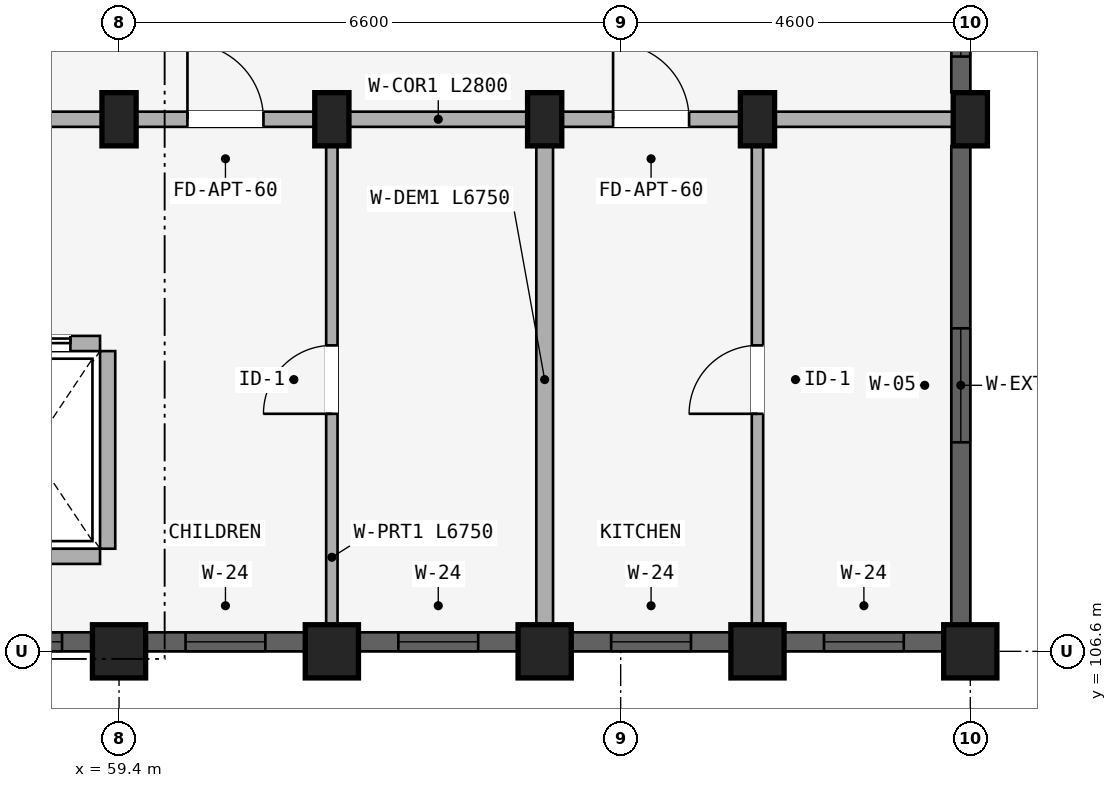
"""IFC4 building model, lengths in metres.
Left out: names, types, materials, properties, quantities, classifications, styles, units other than length and angle.
Written with IfcOpenShell. Run it as: python <this file> out.ifc"""

import sys

from ifc_helpers import new_model, si_unit, direction, frame, frame_2d, origin, origin_2d, place, context, subcontext, project, spatial, rectangle, extrude, element, fill, save


model = new_model("IFC4")
c1 = context("Model", 3, precision=1e-05, world=origin(), true_north=direction((0.0, 1.0)))
c2 = subcontext(c1, "Body", "Model", "MODEL_VIEW")
j1 = project(units=[si_unit("LENGTHUNIT", "METRE"), si_unit("PLANEANGLEUNIT", "RADIAN")], contexts=[c1])
p1 = place(None, origin())
s1 = spatial("IfcSite", under=j1, at=p1, CompositionType="ELEMENT")
p2 = place(p1, origin())
s2 = spatial("IfcBuilding", under=s1, at=p2, CompositionType="ELEMENT")
p3 = place(p2, frame((0.0, 0.0, 21.3)))
s3 = spatial("IfcBuildingStorey", under=s2, at=p3, CompositionType="ELEMENT", Elevation=21.3)
p4 = place(p3, frame((59.4, 106.6, 0.0), z_axis=(0.0, 0.0, 1.0), x_axis=(1.0, 0.0, 0.0)))
e1 = element("IfcColumn", 1, at=p4, inside=s3, PredefinedType="COLUMN", context=c2, shape_type="SweptSolid", body=[
    extrude(rectangle(XDim=0.7, YDim=0.7, at=origin_2d()), origin(), (0.0, 0.0, 1.0), 2.93),
])
p5 = place(p3, frame((59.4, 113.6, 0.0), z_axis=(0.0, 0.0, 1.0), x_axis=(1.0, 0.0, 0.0)))
e2 = element("IfcColumn", 2, at=p5, inside=s3, PredefinedType="COLUMN", context=c2, shape_type="SweptSolid", body=[
    extrude(rectangle(XDim=0.45, YDim=0.7, at=origin_2d()), origin(), (0.0, 0.0, 1.0), 2.93),
])
p6 = place(p3, frame((62.2, 106.6, 0.0), z_axis=(0.0, 0.0, 1.0), x_axis=(1.0, 0.0, 0.0)))
e3 = element("IfcColumn", 3, at=p6, inside=s3, PredefinedType="COLUMN", context=c2, shape_type="SweptSolid", body=[
    extrude(rectangle(XDim=0.7, YDim=0.7, at=origin_2d()), origin(), (0.0, 0.0, 1.0), 2.93),
])
p7 = place(p3, frame((62.2, 113.6, 0.0), z_axis=(0.0, 0.0, 1.0), x_axis=(1.0, 0.0, 0.0)))
e4 = element("IfcColumn", 4, at=p7, inside=s3, PredefinedType="COLUMN", context=c2, shape_type="SweptSolid", body=[
    extrude(rectangle(XDim=0.45, YDim=0.7, at=origin_2d()), origin(), (0.0, 0.0, 1.0), 2.93),
])
p8 = place(p3, frame((65.0, 106.6, 0.0), z_axis=(0.0, 0.0, 1.0), x_axis=(1.0, 0.0, 0.0)))
e5 = element("IfcColumn", 5, at=p8, inside=s3, PredefinedType="COLUMN", context=c2, shape_type="SweptSolid", body=[
    extrude(rectangle(XDim=0.7, YDim=0.7, at=origin_2d()), origin(), (0.0, 0.0, 1.0), 2.93),
])
p9 = place(p3, frame((65.0, 113.6, 0.0), z_axis=(0.0, 0.0, 1.0), x_axis=(1.0, 0.0, 0.0)))
e6 = element("IfcColumn", 6, at=p9, inside=s3, PredefinedType="COLUMN", context=c2, shape_type="SweptSolid", body=[
    extrude(rectangle(XDim=0.45, YDim=0.7, at=origin_2d()), origin(), (0.0, 0.0, 1.0), 2.93),
])
p10 = place(p3, frame((67.8, 106.6, 0.0), z_axis=(0.0, 0.0, 1.0), x_axis=(1.0, 0.0, 0.0)))
e7 = element("IfcColumn", 7, at=p10, inside=s3, PredefinedType="COLUMN", context=c2, shape_type="SweptSolid", body=[
    extrude(rectangle(XDim=0.7, YDim=0.7, at=origin_2d()), origin(), (0.0, 0.0, 1.0), 2.93),
])
p11 = place(p3, frame((67.8, 113.6, 0.0), z_axis=(0.0, 0.0, 1.0), x_axis=(1.0, 0.0, 0.0)))
e8 = element("IfcColumn", 8, at=p11, inside=s3, PredefinedType="COLUMN", context=c2, shape_type="SweptSolid", body=[
    extrude(rectangle(XDim=0.45, YDim=0.7, at=origin_2d()), origin(), (0.0, 0.0, 1.0), 2.93),
])
p12 = place(p3, frame((70.6, 106.6, 0.0), z_axis=(0.0, 0.0, 1.0), x_axis=(1.0, 0.0, 0.0)))
e9 = element("IfcColumn", 9, at=p12, inside=s3, PredefinedType="COLUMN", context=c2, shape_type="SweptSolid", body=[
    extrude(rectangle(XDim=0.7, YDim=0.7, at=origin_2d()), origin(), (0.0, 0.0, 1.0), 2.93),
])
p13 = place(p3, frame((70.6, 113.6, 0.0), z_axis=(0.0, 0.0, 1.0), x_axis=(1.0, 0.0, 0.0)))
e10 = element("IfcColumn", 10, at=p13, inside=s3, PredefinedType="COLUMN", context=c2, shape_type="SweptSolid", body=[
    extrude(rectangle(XDim=0.45, YDim=0.7, at=origin_2d()), origin(), (0.0, 0.0, 1.0), 2.93),
])
p14 = place(p3, frame((59.25, 107.95, 0.0), z_axis=(0.0, 0.0, 1.0), x_axis=(0.0, 1.0, 0.0)))
e11 = element("IfcWall", 11, at=p14, inside=s3, PredefinedType="STANDARD", context=c2, shape_type="SweptSolid", body=[
    extrude(rectangle(XDim=2.6, YDim=0.2, at=frame_2d((1.3, 0.0))), origin(), (0.0, 0.0, 1.0), 2.372),
])
p15 = place(p3, frame((57.35, 107.85, 0.0), z_axis=(0.0, 0.0, 1.0), x_axis=(1.0, 0.0, 0.0)))
e12 = element("IfcWall", 12, at=p15, inside=s3, PredefinedType="STANDARD", context=c2, shape_type="SweptSolid", body=[
    extrude(rectangle(XDim=1.8, YDim=0.2, at=frame_2d((0.9, 0.0))), origin(), (0.0, 0.0, 1.0), 2.93),
])
p16 = place(p3, frame((57.35, 110.65, 0.0), z_axis=(0.0, 0.0, 1.0), x_axis=(1.0, 0.0, 0.0)))
e13 = element("IfcWall", 13, at=p16, inside=s3, PredefinedType="STANDARD", context=c2, shape_type="SweptSolid", body=[
    extrude(rectangle(XDim=1.8, YDim=0.2, at=frame_2d((0.9, 0.0))), origin(), (0.0, 0.0, 1.0), 2.93),
])
p17 = place(p16, frame((0.39, 0.0, 0.0)))
e14 = element("IfcOpeningElement", 14, at=p17, cuts=e13, PredefinedType="OPENING", context=c2, shape_type="SweptSolid", body=[
    extrude(rectangle(XDim=1.02, YDim=2.15, at=frame_2d((0.51, 1.075))), frame((0.0, 0.11, 0.0), z_axis=(0.0, -1.0, 0.0), x_axis=(1.0, 0.0, 0.0)), (0.0, 0.0, 1.0), 0.22),
])
p18 = place(p3, frame((53.75, 113.6, 0.0), z_axis=(0.0, 0.0, 1.0), x_axis=(1.0, 0.0, 0.0)))
e15 = element("IfcWall", 15, at=p18, inside=s3, PredefinedType="STANDARD", context=c2, shape_type="SweptSolid", body=[
    extrude(rectangle(XDim=5.6, YDim=0.2, at=frame_2d((2.8, 0.0))), origin(), (0.0, 0.0, 1.0), 2.372),
])
p19 = place(p18, frame((1.91, 0.0, 0.0)))
e16 = element("IfcOpeningElement", 16, at=p19, cuts=e15, PredefinedType="OPENING", context=c2, shape_type="SweptSolid", body=[
    extrude(rectangle(XDim=1.22, YDim=2.15, at=frame_2d((0.61, 1.075))), frame((0.0, 0.11, 0.0), z_axis=(0.0, -1.0, 0.0), x_axis=(1.0, 0.0, 0.0)), (0.0, 0.0, 1.0), 0.22),
])
p20 = place(p3, frame((59.4, 113.6, 0.0), z_axis=(0.0, 0.0, 1.0), x_axis=(1.0, 0.0, 0.0)))
e17 = element("IfcWall", 17, at=p20, inside=s3, PredefinedType="STANDARD", context=c2, shape_type="SweptSolid", body=[
    extrude(rectangle(XDim=2.8, YDim=0.2, at=frame_2d((1.4, 0.0))), origin(), (0.0, 0.0, 1.0), 2.372),
])
p21 = place(p20, frame((0.9, 0.0, 0.0)))
e18 = element("IfcOpeningElement", 18, at=p21, cuts=e17, PredefinedType="OPENING", context=c2, shape_type="SweptSolid", body=[
    extrude(rectangle(XDim=1.0, YDim=2.15, at=frame_2d((0.5, 1.075))), frame((0.0, 0.11, 0.0), z_axis=(0.0, -1.0, 0.0), x_axis=(1.0, 0.0, 0.0)), (0.0, 0.0, 1.0), 0.22),
])
p22 = place(p3, frame((62.2, 113.6, 0.0), z_axis=(0.0, 0.0, 1.0), x_axis=(1.0, 0.0, 0.0)))
e19 = element("IfcWall", 19, at=p22, inside=s3, PredefinedType="STANDARD", context=c2, shape_type="SweptSolid", body=[
    extrude(rectangle(XDim=2.8, YDim=0.2, at=frame_2d((1.4, 0.0))), origin(), (0.0, 0.0, 1.0), 2.372),
])
p23 = place(p3, frame((65.0, 113.6, 0.0), z_axis=(0.0, 0.0, 1.0), x_axis=(1.0, 0.0, 0.0)))
e20 = element("IfcWall", 20, at=p23, inside=s3, PredefinedType="STANDARD", context=c2, shape_type="SweptSolid", body=[
    extrude(rectangle(XDim=2.8, YDim=0.2, at=frame_2d((1.4, 0.0))), origin(), (0.0, 0.0, 1.0), 2.372),
])
p24 = place(p23, frame((0.9, 0.0, 0.0)))
e21 = element("IfcOpeningElement", 21, at=p24, cuts=e20, PredefinedType="OPENING", context=c2, shape_type="SweptSolid", body=[
    extrude(rectangle(XDim=1.0, YDim=2.15, at=frame_2d((0.5, 1.075))), frame((0.0, 0.11, 0.0), z_axis=(0.0, -1.0, 0.0), x_axis=(1.0, 0.0, 0.0)), (0.0, 0.0, 1.0), 0.22),
])
p25 = place(p3, frame((67.8, 113.6, 0.0), z_axis=(0.0, 0.0, 1.0), x_axis=(1.0, 0.0, 0.0)))
e22 = element("IfcWall", 22, at=p25, inside=s3, PredefinedType="STANDARD", context=c2, shape_type="SweptSolid", body=[
    extrude(rectangle(XDim=2.8, YDim=0.2, at=frame_2d((1.4, 0.0))), origin(), (0.0, 0.0, 1.0), 2.372),
])
p26 = place(p3, frame((62.2, 106.8, 0.0), z_axis=(0.0, 0.0, 1.0), x_axis=(0.0, 1.0, 0.0)))
e23 = element("IfcWall", 23, at=p26, inside=s3, PredefinedType="PARTITIONING", context=c2, shape_type="SweptSolid", body=[
    extrude(rectangle(XDim=6.75, YDim=0.15, at=frame_2d((3.375, 0.0))), origin(), (0.0, 0.0, 1.0), 2.372),
])
p27 = place(p26, frame((2.925, 0.0, 0.0)))
e24 = element("IfcOpeningElement", 24, at=p27, cuts=e23, PredefinedType="OPENING", context=c2, shape_type="SweptSolid", body=[
    extrude(rectangle(XDim=0.9, YDim=2.1, at=frame_2d((0.45, 1.05))), frame((0.0, 0.085, 0.0), z_axis=(0.0, -1.0, 0.0), x_axis=(1.0, 0.0, 0.0)), (0.0, 0.0, 1.0), 0.17),
])
p28 = place(p3, frame((65.0, 106.8, 0.0), z_axis=(0.0, 0.0, 1.0), x_axis=(0.0, 1.0, 0.0)))
e25 = element("IfcWall", 25, at=p28, inside=s3, PredefinedType="STANDARD", context=c2, shape_type="SweptSolid", body=[
    extrude(rectangle(XDim=6.75, YDim=0.22, at=frame_2d((3.375, 0.0))), origin(), (0.0, 0.0, 1.0), 2.372),
])
p29 = place(p3, frame((67.8, 106.8, 0.0), z_axis=(0.0, 0.0, 1.0), x_axis=(0.0, 1.0, 0.0)))
e26 = element("IfcWall", 26, at=p29, inside=s3, PredefinedType="PARTITIONING", context=c2, shape_type="SweptSolid", body=[
    extrude(rectangle(XDim=6.75, YDim=0.15, at=frame_2d((3.375, 0.0))), origin(), (0.0, 0.0, 1.0), 2.372),
])
p30 = place(p29, frame((2.925, 0.0, 0.0)))
e27 = element("IfcOpeningElement", 27, at=p30, cuts=e26, PredefinedType="OPENING", context=c2, shape_type="SweptSolid", body=[
    extrude(rectangle(XDim=0.9, YDim=2.1, at=frame_2d((0.45, 1.05))), frame((0.0, 0.085, 0.0), z_axis=(0.0, -1.0, 0.0), x_axis=(1.0, 0.0, 0.0)), (0.0, 0.0, 1.0), 0.17),
])
p31 = place(p3, frame((56.628, 106.725, 0.0), z_axis=(0.0, 0.0, 1.0), x_axis=(1.0, 0.0, 0.0)))
e28 = element("IfcWall", 28, at=p31, inside=s3, PredefinedType="STANDARD", context=c2, shape_type="SweptSolid", body=[
    extrude(rectangle(XDim=2.422, YDim=0.25, at=frame_2d((1.211, 0.0))), origin(), (0.0, 0.0, 1.0), 2.472),
])
p32 = place(p31, frame((0.822, 0.0, 0.772)))
e29 = element("IfcOpeningElement", 29, at=p32, cuts=e28, PredefinedType="OPENING", context=c2, shape_type="SweptSolid", body=[
    extrude(rectangle(XDim=1.2, YDim=1.5, at=frame_2d((0.6, 0.75))), frame((0.0, 0.135, 0.0), z_axis=(0.0, -1.0, 0.0), x_axis=(1.0, 0.0, 0.0)), (0.0, 0.0, 1.0), 0.27),
])
p33 = place(p3, frame((59.753, 106.725, 0.0), z_axis=(0.0, 0.0, 1.0), x_axis=(1.0, 0.0, 0.0)))
e30 = element("IfcWall", 30, at=p33, inside=s3, PredefinedType="STANDARD", context=c2, shape_type="SweptSolid", body=[
    extrude(rectangle(XDim=2.093, YDim=0.25, at=frame_2d((1.046, 0.0))), origin(), (0.0, 0.0, 1.0), 2.472),
])
p34 = place(p33, frame((0.521, 0.0, 0.88)))
e31 = element("IfcOpeningElement", 31, at=p34, cuts=e30, PredefinedType="OPENING", context=c2, shape_type="SweptSolid", body=[
    extrude(rectangle(XDim=1.05, YDim=1.25, at=frame_2d((0.525, 0.625))), frame((0.0, 0.135, 0.0), z_axis=(0.0, -1.0, 0.0), x_axis=(1.0, 0.0, 0.0)), (0.0, 0.0, 1.0), 0.27),
])
p35 = place(p3, frame((62.553, 106.725, 0.0), z_axis=(0.0, 0.0, 1.0), x_axis=(1.0, 0.0, 0.0)))
e32 = element("IfcWall", 32, at=p35, inside=s3, PredefinedType="STANDARD", context=c2, shape_type="SweptSolid", body=[
    extrude(rectangle(XDim=2.093, YDim=0.25, at=frame_2d((1.046, 0.0))), origin(), (0.0, 0.0, 1.0), 2.472),
])
p36 = place(p35, frame((0.521, 0.0, 0.88)))
e33 = element("IfcOpeningElement", 33, at=p36, cuts=e32, PredefinedType="OPENING", context=c2, shape_type="SweptSolid", body=[
    extrude(rectangle(XDim=1.05, YDim=1.25, at=frame_2d((0.525, 0.625))), frame((0.0, 0.135, 0.0), z_axis=(0.0, -1.0, 0.0), x_axis=(1.0, 0.0, 0.0)), (0.0, 0.0, 1.0), 0.27),
])
p37 = place(p3, frame((65.354, 106.725, 0.0), z_axis=(0.0, 0.0, 1.0), x_axis=(1.0, 0.0, 0.0)))
e34 = element("IfcWall", 34, at=p37, inside=s3, PredefinedType="STANDARD", context=c2, shape_type="SweptSolid", body=[
    extrude(rectangle(XDim=2.093, YDim=0.25, at=frame_2d((1.046, 0.0))), origin(), (0.0, 0.0, 1.0), 2.472),
])
p38 = place(p37, frame((0.521, 0.0, 0.88)))
e35 = element("IfcOpeningElement", 35, at=p38, cuts=e34, PredefinedType="OPENING", context=c2, shape_type="SweptSolid", body=[
    extrude(rectangle(XDim=1.05, YDim=1.25, at=frame_2d((0.525, 0.625))), frame((0.0, 0.135, 0.0), z_axis=(0.0, -1.0, 0.0), x_axis=(1.0, 0.0, 0.0)), (0.0, 0.0, 1.0), 0.27),
])
p39 = place(p3, frame((68.154, 106.725, 0.0), z_axis=(0.0, 0.0, 1.0), x_axis=(1.0, 0.0, 0.0)))
e36 = element("IfcWall", 36, at=p39, inside=s3, PredefinedType="STANDARD", context=c2, shape_type="SweptSolid", body=[
    extrude(rectangle(XDim=2.093, YDim=0.25, at=frame_2d((1.046, 0.0))), origin(), (0.0, 0.0, 1.0), 2.472),
])
p40 = place(p39, frame((0.521, 0.0, 0.88)))
e37 = element("IfcOpeningElement", 37, at=p40, cuts=e36, PredefinedType="OPENING", context=c2, shape_type="SweptSolid", body=[
    extrude(rectangle(XDim=1.05, YDim=1.25, at=frame_2d((0.525, 0.625))), frame((0.0, 0.135, 0.0), z_axis=(0.0, -1.0, 0.0), x_axis=(1.0, 0.0, 0.0)), (0.0, 0.0, 1.0), 0.27),
])
p41 = place(p3, frame((70.475, 106.954, 0.0), z_axis=(0.0, 0.0, 1.0), x_axis=(0.0, 1.0, 0.0)))
e38 = element("IfcWall", 38, at=p41, inside=s3, PredefinedType="STANDARD", context=c2, shape_type="SweptSolid", body=[
    extrude(rectangle(XDim=6.293, YDim=0.25, at=frame_2d((3.146, 0.0))), origin(), (0.0, 0.0, 1.0), 2.372),
])
p42 = place(p41, frame((2.396, 0.0, 0.522)))
e39 = element("IfcOpeningElement", 39, at=p42, cuts=e38, PredefinedType="OPENING", context=c2, shape_type="SweptSolid", body=[
    extrude(rectangle(XDim=1.5, YDim=1.65, at=frame_2d((0.75, 0.825))), frame((0.0, 0.135, 0.0), z_axis=(0.0, -1.0, 0.0), x_axis=(1.0, 0.0, 0.0)), (0.0, 0.0, 1.0), 0.27),
])
p43 = place(p3, frame((70.475, 113.954, 0.0), z_axis=(0.0, 0.0, 1.0), x_axis=(0.0, 1.0, 0.0)))
e40 = element("IfcWall", 40, at=p43, inside=s3, PredefinedType="STANDARD", context=c2, shape_type="SweptSolid", body=[
    extrude(rectangle(XDim=1.693, YDim=0.25, at=frame_2d((0.846, 0.0))), origin(), (0.0, 0.0, 1.0), 2.372),
])
p44 = place(p43, frame((0.471, 0.0, 0.88)))
e41 = element("IfcOpeningElement", 41, at=p44, cuts=e40, PredefinedType="OPENING", context=c2, shape_type="SweptSolid", body=[
    extrude(rectangle(XDim=0.75, YDim=1.05, at=frame_2d((0.375, 0.525))), frame((0.0, 0.135, 0.0), z_axis=(0.0, -1.0, 0.0), x_axis=(1.0, 0.0, 0.0)), (0.0, 0.0, 1.0), 0.27),
])
p45 = place(p32, origin())
e42 = element("IfcWindow", 42, at=p45, inside=s3, PartitioningType="SINGLE_PANEL", PredefinedType="WINDOW", context=c2, shape_type="SweptSolid", body=[
    extrude(rectangle(XDim=1.2, YDim=1.5, at=frame_2d((0.6, 0.75))), frame((0.0, 0.03, 0.0), z_axis=(0.0, -1.0, 0.0), x_axis=(1.0, 0.0, 0.0)), (0.0, 0.0, 1.0), 0.06),
])
fill(e29, e42)
p46 = place(p34, origin())
e43 = element("IfcWindow", 43, at=p46, inside=s3, PartitioningType="SINGLE_PANEL", PredefinedType="WINDOW", context=c2, shape_type="SweptSolid", body=[
    extrude(rectangle(XDim=1.05, YDim=1.25, at=frame_2d((0.525, 0.625))), frame((0.0, 0.03, 0.0), z_axis=(0.0, -1.0, 0.0), x_axis=(1.0, 0.0, 0.0)), (0.0, 0.0, 1.0), 0.06),
])
fill(e31, e43)
p47 = place(p36, origin())
e44 = element("IfcWindow", 44, at=p47, inside=s3, PartitioningType="SINGLE_PANEL", PredefinedType="WINDOW", context=c2, shape_type="SweptSolid", body=[
    extrude(rectangle(XDim=1.05, YDim=1.25, at=frame_2d((0.525, 0.625))), frame((0.0, 0.03, 0.0), z_axis=(0.0, -1.0, 0.0), x_axis=(1.0, 0.0, 0.0)), (0.0, 0.0, 1.0), 0.06),
])
fill(e33, e44)
p48 = place(p38, origin())
e45 = element("IfcWindow", 45, at=p48, inside=s3, PartitioningType="SINGLE_PANEL", PredefinedType="WINDOW", context=c2, shape_type="SweptSolid", body=[
    extrude(rectangle(XDim=1.05, YDim=1.25, at=frame_2d((0.525, 0.625))), frame((0.0, 0.03, 0.0), z_axis=(0.0, -1.0, 0.0), x_axis=(1.0, 0.0, 0.0)), (0.0, 0.0, 1.0), 0.06),
])
fill(e35, e45)
p49 = place(p40, origin())
e46 = element("IfcWindow", 46, at=p49, inside=s3, PartitioningType="SINGLE_PANEL", PredefinedType="WINDOW", context=c2, shape_type="SweptSolid", body=[
    extrude(rectangle(XDim=1.05, YDim=1.25, at=frame_2d((0.525, 0.625))), frame((0.0, 0.03, 0.0), z_axis=(0.0, -1.0, 0.0), x_axis=(1.0, 0.0, 0.0)), (0.0, 0.0, 1.0), 0.06),
])
fill(e37, e46)
p50 = place(p42, origin())
e47 = element("IfcWindow", 47, at=p50, inside=s3, PartitioningType="DOUBLE_PANEL_VERTICAL", PredefinedType="WINDOW", context=c2, shape_type="SweptSolid", body=[
    extrude(rectangle(XDim=1.5, YDim=1.65, at=frame_2d((0.75, 0.825))), frame((0.0, 0.03, 0.0), z_axis=(0.0, -1.0, 0.0), x_axis=(1.0, 0.0, 0.0)), (0.0, 0.0, 1.0), 0.06),
])
fill(e39, e47)
p51 = place(p44, origin())
e48 = element("IfcWindow", 48, at=p51, inside=s3, PartitioningType="SINGLE_PANEL", PredefinedType="WINDOW", context=c2, shape_type="SweptSolid", body=[
    extrude(rectangle(XDim=0.75, YDim=1.05, at=frame_2d((0.375, 0.525))), frame((0.0, 0.03, 0.0), z_axis=(0.0, -1.0, 0.0), x_axis=(1.0, 0.0, 0.0)), (0.0, 0.0, 1.0), 0.06),
])
fill(e41, e48)
p52 = place(p17, origin())
e49 = element("IfcDoor", 49, at=p52, inside=s3, OperationType="SLIDING_TO_RIGHT", PredefinedType="DOOR", context=c2, shape_type="SweptSolid", body=[
    extrude(rectangle(XDim=1.02, YDim=2.15, at=frame_2d((0.51, 1.075))), frame((0.0, 0.025, 0.0), z_axis=(0.0, -1.0, 0.0), x_axis=(1.0, 0.0, 0.0)), (0.0, 0.0, 1.0), 0.05),
])
fill(e14, e49)
p53 = place(p21, origin())
e50 = element("IfcDoor", 50, at=p53, inside=s3, OperationType="SINGLE_SWING_LEFT", PredefinedType="DOOR", context=c2, shape_type="SweptSolid", body=[
    extrude(rectangle(XDim=1.0, YDim=2.15, at=frame_2d((0.5, 1.075))), frame((0.0, 0.025, 0.0), z_axis=(0.0, -1.0, 0.0), x_axis=(1.0, 0.0, 0.0)), (0.0, 0.0, 1.0), 0.05),
])
fill(e18, e50)
p54 = place(p24, origin())
e51 = element("IfcDoor", 51, at=p54, inside=s3, OperationType="SINGLE_SWING_LEFT", PredefinedType="DOOR", context=c2, shape_type="SweptSolid", body=[
    extrude(rectangle(XDim=1.0, YDim=2.15, at=frame_2d((0.5, 1.075))), frame((0.0, 0.025, 0.0), z_axis=(0.0, -1.0, 0.0), x_axis=(1.0, 0.0, 0.0)), (0.0, 0.0, 1.0), 0.05),
])
fill(e21, e51)
p55 = place(p27, frame((0.9, 0.0, 0.0), z_axis=(0.0, 0.0, 1.0), x_axis=(-1.0, 0.0, 0.0)))
e52 = element("IfcDoor", 52, at=p55, inside=s3, OperationType="SINGLE_SWING_RIGHT", PredefinedType="DOOR", context=c2, shape_type="SweptSolid", body=[
    extrude(rectangle(XDim=0.9, YDim=2.1, at=frame_2d((0.45, 1.05))), frame((0.0, 0.025, 0.0), z_axis=(0.0, -1.0, 0.0), x_axis=(1.0, 0.0, 0.0)), (0.0, 0.0, 1.0), 0.05),
])
fill(e24, e52)
p56 = place(p30, origin())
e53 = element("IfcDoor", 53, at=p56, inside=s3, OperationType="SINGLE_SWING_LEFT", PredefinedType="DOOR", context=c2, shape_type="SweptSolid", body=[
    extrude(rectangle(XDim=0.9, YDim=2.1, at=frame_2d((0.45, 1.05))), frame((0.0, 0.025, 0.0), z_axis=(0.0, -1.0, 0.0), x_axis=(1.0, 0.0, 0.0)), (0.0, 0.0, 1.0), 0.05),
])
fill(e27, e53)
save(model, sys.argv[1])
